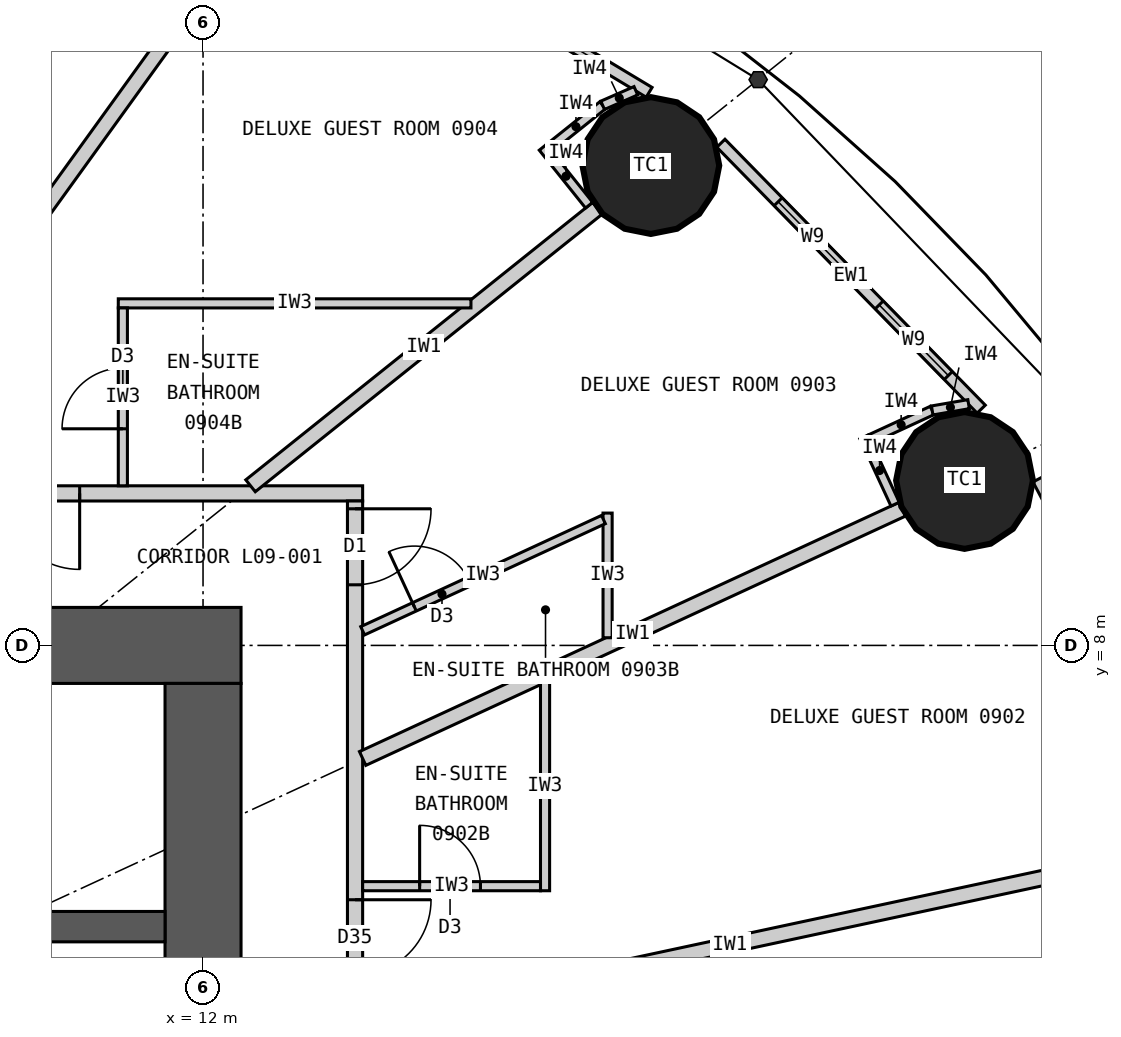
"""IFC4 building model, lengths in metres.
Left out: names, types, materials, properties, quantities, classifications, styles, units other than length and angle.
Written with IfcOpenShell. Run it as: python <this file> out.ifc"""

import sys

from ifc_helpers import new_model, si_unit, direction, frame, frame_2d, origin, origin_2d, place, context, subcontext, project, spatial, rectangle, circle, extrude, element, fill, save


model = new_model("IFC4")
c1 = context("Model", 3, precision=1e-05, world=origin(), true_north=direction((0.0, 1.0)))
c2 = subcontext(c1, "Body", "Model", "MODEL_VIEW")
j1 = project(units=[si_unit("LENGTHUNIT", "METRE"), si_unit("PLANEANGLEUNIT", "RADIAN")], contexts=[c1])
p1 = place(None, origin())
s1 = spatial("IfcSite", under=j1, at=p1, CompositionType="ELEMENT")
p2 = place(p1, origin())
s2 = spatial("IfcBuilding", under=s1, at=p2, CompositionType="ELEMENT")
p3 = place(p2, frame((0.0, 0.0, 42.6)))
s3 = spatial("IfcBuildingStorey", under=s2, at=p3, CompositionType="ELEMENT", Elevation=42.6)
for number, where, z_axis, x_axis in (
    (1, (22.019, 10.17, 0.0), (0.0, 0.0, 1.0), (1.0, 0.0, 0.0)),
    (2, (17.892, 14.313, 0.0), (0.0, 0.0, 1.0), (1.0, 0.0, 0.0)),
):
    element("IfcColumn", number, at=place(p3, frame(where, z_axis=z_axis, x_axis=x_axis)), inside=s3, PredefinedType="COLUMN", context=c2, shape_type="SweptSolid", body=[
        extrude(circle(Radius=0.9, at=origin_2d()), origin(), (0.0, 0.0, 1.0), 3.3),
    ])
p4 = place(p3, frame((-12.5, 8.0, 0.0), z_axis=(0.0, 0.0, 1.0), x_axis=(1.0, 0.0, 0.0)))
e3 = element("IfcWall", 3, at=p4, inside=s3, PredefinedType="SHEAR", context=c2, shape_type="SweptSolid", body=[
    extrude(rectangle(XDim=25.0, YDim=1.0, at=frame_2d((12.5, 0.0))), origin(), (0.0, 0.0, 1.0), 3.3),
])
p5 = place(p4, frame((11.2, 0.0, 0.0)))
e4 = element("IfcOpeningElement", 4, at=p5, cuts=e3, PredefinedType="OPENING", context=c2, shape_type="SweptSolid", body=[
    extrude(rectangle(XDim=1.2, YDim=2.2, at=frame_2d((0.6, 1.1))), frame((0.0, 0.51, 0.0), z_axis=(0.0, -1.0, 0.0), x_axis=(1.0, 0.0, 0.0)), (0.0, 0.0, 1.0), 1.02),
])
p6 = place(p4, frame((18.8, 0.0, 0.0)))
e5 = element("IfcOpeningElement", 5, at=p6, cuts=e3, PredefinedType="OPENING", context=c2, shape_type="SweptSolid", body=[
    extrude(rectangle(XDim=0.9, YDim=2.2, at=frame_2d((0.45, 1.1))), frame((0.0, 0.51, 0.0), z_axis=(0.0, -1.0, 0.0), x_axis=(1.0, 0.0, 0.0)), (0.0, 0.0, 1.0), 1.02),
])
p7 = place(p3, frame((12.0, -7.5, 0.0), z_axis=(0.0, 0.0, 1.0), x_axis=(0.0, 1.0, 0.0)))
e6 = element("IfcWall", 6, at=p7, inside=s3, PredefinedType="SHEAR", context=c2, shape_type="SweptSolid", body=[
    extrude(rectangle(XDim=15.0, YDim=1.0, at=frame_2d((7.5, 0.0))), origin(), (0.0, 0.0, 1.0), 3.3),
])
p8 = place(p7, frame((6.6, 0.0, 0.0)))
e7 = element("IfcOpeningElement", 7, at=p8, cuts=e6, PredefinedType="OPENING", context=c2, shape_type="SweptSolid", body=[
    extrude(rectangle(XDim=1.8, YDim=2.2, at=frame_2d((0.9, 1.1))), frame((0.0, 0.51, 0.0), z_axis=(0.0, -1.0, 0.0), x_axis=(1.0, 0.0, 0.0)), (0.0, 0.0, 1.0), 1.02),
])
p9 = place(p3, frame((-11.5, 4.3, 0.0), z_axis=(0.0, 0.0, 1.0), x_axis=(1.0, 0.0, 0.0)))
e8 = element("IfcWall", 8, at=p9, inside=s3, PredefinedType="SHEAR", context=c2, shape_type="SweptSolid", body=[
    extrude(rectangle(XDim=23.0, YDim=0.4, at=frame_2d((11.5, 0.0))), origin(), (0.0, 0.0, 1.0), 3.3),
])
p10 = place(p3, frame((25.139, 6.113, 0.0), z_axis=(0.0, 0.0, 1.0), x_axis=(-0.467303182954, 0.884097129959, 0.0)))
e9 = element("IfcWall", 9, at=p10, inside=s3, PredefinedType="ELEMENTEDWALL", context=c2, shape_type="SweptSolid", body=[
    extrude(rectangle(XDim=4.606, YDim=0.15, at=frame_2d((2.303, 0.0))), origin(), (0.0, 0.0, 1.0), 3.05),
])
p11 = place(p10, frame((0.531, 0.0, 0.9)))
e10 = element("IfcOpeningElement", 10, at=p11, cuts=e9, PredefinedType="OPENING", context=c2, shape_type="SweptSolid", body=[
    extrude(rectangle(XDim=1.3, YDim=1.9, at=frame_2d((0.65, 0.95))), frame((0.0, 0.085, 0.0), z_axis=(0.0, -1.0, 0.0), x_axis=(1.0, 0.0, 0.0)), (0.0, 0.0, 1.0), 0.17),
])
p12 = place(p10, frame((2.432, 0.0, 0.9)))
e11 = element("IfcOpeningElement", 11, at=p12, cuts=e9, PredefinedType="OPENING", context=c2, shape_type="SweptSolid", body=[
    extrude(rectangle(XDim=1.3, YDim=1.9, at=frame_2d((0.65, 0.95))), frame((0.0, 0.085, 0.0), z_axis=(0.0, -1.0, 0.0), x_axis=(1.0, 0.0, 0.0)), (0.0, 0.0, 1.0), 0.17),
])
p13 = place(p3, frame((22.239, 11.108, 0.0), z_axis=(0.0, 0.0, 1.0), x_axis=(-0.699612594083, 0.714522370679, 0.0)))
e12 = element("IfcWall", 12, at=p13, inside=s3, PredefinedType="ELEMENTEDWALL", context=c2, shape_type="SweptSolid", body=[
    extrude(rectangle(XDim=4.896, YDim=0.15, at=frame_2d((2.448, 0.0))), origin(), (0.0, 0.0, 1.0), 3.05),
])
p14 = place(p13, frame((0.619, 0.0, 0.9)))
e13 = element("IfcOpeningElement", 13, at=p14, cuts=e12, PredefinedType="OPENING", context=c2, shape_type="SweptSolid", body=[
    extrude(rectangle(XDim=1.3, YDim=1.9, at=frame_2d((0.65, 0.95))), frame((0.0, 0.085, 0.0), z_axis=(0.0, -1.0, 0.0), x_axis=(1.0, 0.0, 0.0)), (0.0, 0.0, 1.0), 0.17),
])
p15 = place(p13, frame((2.519, 0.0, 0.9)))
e14 = element("IfcOpeningElement", 14, at=p15, cuts=e12, PredefinedType="OPENING", context=c2, shape_type="SweptSolid", body=[
    extrude(rectangle(XDim=1.3, YDim=1.9, at=frame_2d((0.65, 0.95))), frame((0.0, 0.085, 0.0), z_axis=(0.0, -1.0, 0.0), x_axis=(1.0, 0.0, 0.0)), (0.0, 0.0, 1.0), 0.17),
])
p16 = place(p3, frame((17.869, 15.277, 0.0), z_axis=(0.0, 0.0, 1.0), x_axis=(-0.856958191554, 0.515385931054, 0.0)))
e15 = element("IfcWall", 15, at=p16, inside=s3, PredefinedType="ELEMENTEDWALL", context=c2, shape_type="SweptSolid", body=[
    extrude(rectangle(XDim=5.201, YDim=0.15, at=frame_2d((2.601, 0.0))), origin(), (0.0, 0.0, 1.0), 3.05),
])
p17 = place(p16, frame((0.776, 0.0, 0.9)))
e16 = element("IfcOpeningElement", 16, at=p17, cuts=e15, PredefinedType="OPENING", context=c2, shape_type="SweptSolid", body=[
    extrude(rectangle(XDim=1.3, YDim=1.9, at=frame_2d((0.65, 0.95))), frame((0.0, 0.085, 0.0), z_axis=(0.0, -1.0, 0.0), x_axis=(1.0, 0.0, 0.0)), (0.0, 0.0, 1.0), 0.17),
])
p18 = place(p16, frame((2.676, 0.0, 0.9)))
e17 = element("IfcOpeningElement", 17, at=p18, cuts=e15, PredefinedType="OPENING", context=c2, shape_type="SweptSolid", body=[
    extrude(rectangle(XDim=1.3, YDim=1.9, at=frame_2d((0.65, 0.95))), frame((0.0, 0.085, 0.0), z_axis=(0.0, -1.0, 0.0), x_axis=(1.0, 0.0, 0.0)), (0.0, 0.0, 1.0), 0.17),
])
p19 = place(p3, frame((-14.1, 10.0, 0.0), z_axis=(0.0, 0.0, 1.0), x_axis=(1.0, 0.0, 0.0)))
e18 = element("IfcWall", 18, at=p19, inside=s3, PredefinedType="PARTITIONING", context=c2, shape_type="SweptSolid", body=[
    extrude(rectangle(XDim=28.2, YDim=0.2, at=frame_2d((14.1, 0.0))), origin(), (0.0, 0.0, 1.0), 3.05),
])
p20 = place(p19, frame((23.477, 0.0, 0.0)))
e19 = element("IfcOpeningElement", 19, at=p20, cuts=e18, PredefinedType="OPENING", context=c2, shape_type="SweptSolid", body=[
    extrude(rectangle(XDim=1.0, YDim=2.2, at=frame_2d((0.5, 1.1))), frame((0.0, 0.11, 0.0), z_axis=(0.0, -1.0, 0.0), x_axis=(1.0, 0.0, 0.0)), (0.0, 0.0, 1.0), 0.22),
])
p21 = place(p19, frame((18.529, 0.0, 0.0)))
e20 = element("IfcOpeningElement", 20, at=p21, cuts=e18, PredefinedType="OPENING", context=c2, shape_type="SweptSolid", body=[
    extrude(rectangle(XDim=1.0, YDim=2.2, at=frame_2d((0.5, 1.1))), frame((0.0, 0.11, 0.0), z_axis=(0.0, -1.0, 0.0), x_axis=(1.0, 0.0, 0.0)), (0.0, 0.0, 1.0), 0.22),
])
p22 = place(p19, frame((14.623, 0.0, 0.0)))
e21 = element("IfcOpeningElement", 21, at=p22, cuts=e18, PredefinedType="OPENING", context=c2, shape_type="SweptSolid", body=[
    extrude(rectangle(XDim=1.0, YDim=2.2, at=frame_2d((0.5, 1.1))), frame((0.0, 0.11, 0.0), z_axis=(0.0, -1.0, 0.0), x_axis=(1.0, 0.0, 0.0)), (0.0, 0.0, 1.0), 0.22),
])
p23 = place(p19, frame((11.252, 0.0, 0.0)))
e22 = element("IfcOpeningElement", 22, at=p23, cuts=e18, PredefinedType="OPENING", context=c2, shape_type="SweptSolid", body=[
    extrude(rectangle(XDim=1.0, YDim=2.1, at=frame_2d((0.5, 1.05))), frame((0.0, 0.11, 0.0), z_axis=(0.0, -1.0, 0.0), x_axis=(1.0, 0.0, 0.0)), (0.0, 0.0, 1.0), 0.22),
])
p24 = place(p19, frame((8.671, 0.0, 0.0)))
e23 = element("IfcOpeningElement", 23, at=p24, cuts=e18, PredefinedType="OPENING", context=c2, shape_type="SweptSolid", body=[
    extrude(rectangle(XDim=1.0, YDim=2.2, at=frame_2d((0.5, 1.1))), frame((0.0, 0.11, 0.0), z_axis=(0.0, -1.0, 0.0), x_axis=(1.0, 0.0, 0.0)), (0.0, 0.0, 1.0), 0.22),
])
p25 = place(p19, frame((1.616, 0.0, 0.0)))
e24 = element("IfcOpeningElement", 24, at=p25, cuts=e18, PredefinedType="OPENING", context=c2, shape_type="SweptSolid", body=[
    extrude(rectangle(XDim=1.0, YDim=2.2, at=frame_2d((0.5, 1.1))), frame((0.0, 0.11, 0.0), z_axis=(0.0, -1.0, 0.0), x_axis=(1.0, 0.0, 0.0)), (0.0, 0.0, 1.0), 0.22),
])
p26 = place(p3, frame((14.0, -9.9, 0.0), z_axis=(0.0, 0.0, 1.0), x_axis=(0.0, 1.0, 0.0)))
e25 = element("IfcWall", 25, at=p26, inside=s3, PredefinedType="PARTITIONING", context=c2, shape_type="SweptSolid", body=[
    extrude(rectangle(XDim=19.8, YDim=0.2, at=frame_2d((9.9, 0.0))), origin(), (0.0, 0.0, 1.0), 3.05),
])
p27 = place(p26, frame((11.698, 0.0, 0.0)))
e26 = element("IfcOpeningElement", 26, at=p27, cuts=e25, PredefinedType="OPENING", context=c2, shape_type="SweptSolid", body=[
    extrude(rectangle(XDim=1.0, YDim=2.2, at=frame_2d((0.5, 1.1))), frame((0.0, 0.11, 0.0), z_axis=(0.0, -1.0, 0.0), x_axis=(1.0, 0.0, 0.0)), (0.0, 0.0, 1.0), 0.22),
])
p28 = place(p26, frame((13.554, 0.0, 0.0)))
e27 = element("IfcOpeningElement", 27, at=p28, cuts=e25, PredefinedType="OPENING", context=c2, shape_type="SweptSolid", body=[
    extrude(rectangle(XDim=1.0, YDim=2.0, at=frame_2d((0.5, 1.0))), frame((0.0, 0.11, 0.0), z_axis=(0.0, -1.0, 0.0), x_axis=(1.0, 0.0, 0.0)), (0.0, 0.0, 1.0), 0.22),
])
p29 = place(p26, frame((18.698, 0.0, 0.0)))
e28 = element("IfcOpeningElement", 28, at=p29, cuts=e25, PredefinedType="OPENING", context=c2, shape_type="SweptSolid", body=[
    extrude(rectangle(XDim=1.0, YDim=2.2, at=frame_2d((0.5, 1.1))), frame((0.0, 0.11, 0.0), z_axis=(0.0, -1.0, 0.0), x_axis=(1.0, 0.0, 0.0)), (0.0, 0.0, 1.0), 0.22),
])
p30 = place(p26, frame((0.975, 0.0, 0.0)))
e29 = element("IfcOpeningElement", 29, at=p30, cuts=e25, PredefinedType="OPENING", context=c2, shape_type="SweptSolid", body=[
    extrude(rectangle(XDim=1.0, YDim=2.2, at=frame_2d((0.5, 1.1))), frame((0.0, 0.11, 0.0), z_axis=(0.0, -1.0, 0.0), x_axis=(1.0, 0.0, 0.0)), (0.0, 0.0, 1.0), 0.22),
])
p31 = place(p26, frame((7.097, 0.0, 0.0)))
e30 = element("IfcOpeningElement", 30, at=p31, cuts=e25, PredefinedType="OPENING", context=c2, shape_type="SweptSolid", body=[
    extrude(rectangle(XDim=1.0, YDim=2.2, at=frame_2d((0.5, 1.1))), frame((0.0, 0.11, 0.0), z_axis=(0.0, -1.0, 0.0), x_axis=(1.0, 0.0, 0.0)), (0.0, 0.0, 1.0), 0.22),
])
p32 = place(p3, frame((14.1, 3.022, 0.0), z_axis=(0.0, 0.0, 1.0), x_axis=(0.977786510688, 0.209603290805, 0.0)))
e31 = element("IfcWall", 31, at=p32, inside=s3, PredefinedType="PARTITIONING", context=c2, shape_type="SweptSolid", body=[
    extrude(rectangle(XDim=9.887, YDim=0.2, at=frame_2d((4.943, 0.0))), origin(), (0.0, 0.0, 1.0), 2.05),
])
p33 = place(p3, frame((14.1, 6.512, 0.0), z_axis=(0.0, 0.0, 1.0), x_axis=(0.907842433118, 0.41931147925, 0.0)))
e32 = element("IfcWall", 32, at=p33, inside=s3, PredefinedType="PARTITIONING", context=c2, shape_type="SweptSolid", body=[
    extrude(rectangle(XDim=7.823, YDim=0.2, at=frame_2d((3.912, 0.0))), origin(), (0.0, 0.0, 1.0), 2.15),
])
p34 = place(p3, frame((12.625, 10.1, 0.0), z_axis=(0.0, 0.0, 1.0), x_axis=(0.780872884676, 0.624689953479, 0.0)))
e33 = element("IfcWall", 33, at=p34, inside=s3, PredefinedType="PARTITIONING", context=c2, shape_type="SweptSolid", body=[
    extrude(rectangle(XDim=5.845, YDim=0.2, at=frame_2d((2.922, 0.0))), origin(), (0.0, 0.0, 1.0), 2.15),
])
p35 = place(p3, frame((7.289, 10.1, 0.0), z_axis=(0.0, 0.0, 1.0), x_axis=(0.585216319319, 0.810877216108, 0.0)))
e34 = element("IfcWall", 34, at=p35, inside=s3, PredefinedType="PARTITIONING", context=c2, shape_type="SweptSolid", body=[
    extrude(rectangle(XDim=8.16, YDim=0.2, at=frame_2d((4.08, 0.0))), origin(), (0.0, 0.0, 1.0), 2.15),
])
p36 = place(p3, frame((16.5, 7.521, 0.0), z_axis=(0.0, 0.0, 1.0), x_axis=(0.0, -1.0, 0.0)))
e35 = element("IfcWall", 35, at=p36, inside=s3, PredefinedType="PARTITIONING", context=c2, shape_type="SweptSolid", body=[
    extrude(rectangle(XDim=2.749, YDim=0.12, at=frame_2d((1.374, 0.0))), origin(), (0.0, 0.0, 1.0), 3.05),
])
p37 = place(p3, frame((14.1, 4.833, 0.0), z_axis=(0.0, 0.0, 1.0), x_axis=(1.0, 0.0, 0.0)))
e36 = element("IfcWall", 36, at=p37, inside=s3, PredefinedType="PARTITIONING", context=c2, shape_type="SweptSolid", body=[
    extrude(rectangle(XDim=2.34, YDim=0.12, at=frame_2d((1.17, 0.0))), origin(), (0.0, 0.0, 1.0), 3.05),
])
p38 = place(p37, frame((0.75, 0.0, 0.0)))
e37 = element("IfcOpeningElement", 37, at=p38, cuts=e36, PredefinedType="OPENING", context=c2, shape_type="SweptSolid", body=[
    extrude(rectangle(XDim=0.8, YDim=2.1, at=frame_2d((0.4, 1.05))), frame((0.0, 0.07, 0.0), z_axis=(0.0, -1.0, 0.0), x_axis=(1.0, 0.0, 0.0)), (0.0, 0.0, 1.0), 0.14),
])
p39 = place(p3, frame((17.323, 8.101, 0.0), z_axis=(0.0, 0.0, 1.0), x_axis=(0.0, 1.0, 0.0)))
e38 = element("IfcWall", 38, at=p39, inside=s3, PredefinedType="PARTITIONING", context=c2, shape_type="SweptSolid", body=[
    extrude(rectangle(XDim=1.64, YDim=0.12, at=frame_2d((0.82, 0.0))), origin(), (0.0, 0.0, 1.0), 3.05),
])
p40 = place(p3, frame((14.1, 8.193, 0.0), z_axis=(0.0, 0.0, 1.0), x_axis=(0.907836493557, 0.419324338628, 0.0)))
e39 = element("IfcWall", 39, at=p40, inside=s3, PredefinedType="PARTITIONING", context=c2, shape_type="SweptSolid", body=[
    extrude(rectangle(XDim=3.49, YDim=0.12, at=frame_2d((1.745, 0.0))), origin(), (0.0, 0.0, 1.0), 3.05),
])
p41 = place(p40, frame((0.75, 0.0, 0.0)))
e40 = element("IfcOpeningElement", 40, at=p41, cuts=e39, PredefinedType="OPENING", context=c2, shape_type="SweptSolid", body=[
    extrude(rectangle(XDim=0.8, YDim=2.1, at=frame_2d((0.4, 1.05))), frame((0.0, 0.07, 0.0), z_axis=(0.0, -1.0, 0.0), x_axis=(1.0, 0.0, 0.0)), (0.0, 0.0, 1.0), 0.14),
])
p42 = place(p3, frame((15.525, 12.5, 0.0), z_axis=(0.0, 0.0, 1.0), x_axis=(-1.0, 0.0, 0.0)))
e41 = element("IfcWall", 41, at=p42, inside=s3, PredefinedType="PARTITIONING", context=c2, shape_type="SweptSolid", body=[
    extrude(rectangle(XDim=4.64, YDim=0.12, at=frame_2d((2.32, 0.0))), origin(), (0.0, 0.0, 1.0), 3.05),
])
p43 = place(p3, frame((10.945, 10.1, 0.0), z_axis=(0.0, 0.0, 1.0), x_axis=(0.0, 1.0, 0.0)))
e42 = element("IfcWall", 42, at=p43, inside=s3, PredefinedType="PARTITIONING", context=c2, shape_type="SweptSolid", body=[
    extrude(rectangle(XDim=2.34, YDim=0.12, at=frame_2d((1.17, 0.0))), origin(), (0.0, 0.0, 1.0), 3.05),
])
p44 = place(p43, frame((0.75, 0.0, 0.0)))
e43 = element("IfcOpeningElement", 43, at=p44, cuts=e42, PredefinedType="OPENING", context=c2, shape_type="SweptSolid", body=[
    extrude(rectangle(XDim=0.8, YDim=2.1, at=frame_2d((0.4, 1.05))), frame((0.0, 0.07, 0.0), z_axis=(0.0, -1.0, 0.0), x_axis=(1.0, 0.0, 0.0)), (0.0, 0.0, 1.0), 0.14),
])
p45 = place(p3, frame((21.106, 9.858, 0.0), z_axis=(0.0, 0.0, 1.0), x_axis=(-0.419344098106, 0.907827366509, 0.0)))
e44 = element("IfcWall", 44, at=p45, inside=s3, PredefinedType="PARTITIONING", context=c2, shape_type="SweptSolid", body=[
    extrude(rectangle(XDim=0.975, YDim=0.12, at=frame_2d((0.487, 0.0))), origin(), (0.0, 0.0, 1.0), 3.05),
])
p46 = place(p3, frame((20.777, 10.714, 0.0), z_axis=(0.0, 0.0, 1.0), x_axis=(0.907832324198, 0.419333365166, 0.0)))
e45 = element("IfcWall", 45, at=p46, inside=s3, PredefinedType="PARTITIONING", context=c2, shape_type="SweptSolid", body=[
    extrude(rectangle(XDim=0.9, YDim=0.12, at=frame_2d((0.45, 0.0))), origin(), (0.0, 0.0, 1.0), 3.05),
])
p47 = place(p3, frame((21.594, 11.091, 0.0), z_axis=(0.0, 0.0, 1.0), x_axis=(0.985483306792, 0.169772353566, 0.0)))
e46 = element("IfcWall", 46, at=p47, inside=s3, PredefinedType="PARTITIONING", context=c2, shape_type="SweptSolid", body=[
    extrude(rectangle(XDim=0.486, YDim=0.12, at=frame_2d((0.243, 0.0))), origin(), (0.0, 0.0, 1.0), 3.05),
])
p48 = place(p3, frame((17.08, 13.792, 0.0), z_axis=(0.0, 0.0, 1.0), x_axis=(-0.624756144097, 0.780819928289, 0.0)))
e47 = element("IfcWall", 47, at=p48, inside=s3, PredefinedType="PARTITIONING", context=c2, shape_type="SweptSolid", body=[
    extrude(rectangle(XDim=0.975, YDim=0.12, at=frame_2d((0.487, 0.0))), origin(), (0.0, 0.0, 1.0), 3.05),
])
p49 = place(p3, frame((16.555, 14.543, 0.0), z_axis=(0.0, 0.0, 1.0), x_axis=(0.780789399477, 0.62479429708, 0.0)))
e48 = element("IfcWall", 48, at=p49, inside=s3, PredefinedType="PARTITIONING", context=c2, shape_type="SweptSolid", body=[
    extrude(rectangle(XDim=0.9, YDim=0.12, at=frame_2d((0.45, 0.0))), origin(), (0.0, 0.0, 1.0), 3.05),
])
p50 = place(p3, frame((17.258, 15.106, 0.0), z_axis=(0.0, 0.0, 1.0), x_axis=(0.916098562583, 0.400953143937, 0.0)))
e49 = element("IfcWall", 49, at=p50, inside=s3, PredefinedType="PARTITIONING", context=c2, shape_type="SweptSolid", body=[
    extrude(rectangle(XDim=0.477, YDim=0.12, at=frame_2d((0.238, 0.0))), origin(), (0.0, 0.0, 1.0), 3.05),
])
p51 = place(p14, origin())
e50 = element("IfcWindow", 50, at=p51, inside=s3, PartitioningType="SINGLE_PANEL", PredefinedType="WINDOW", context=c2, shape_type="SweptSolid", body=[
    extrude(rectangle(XDim=1.3, YDim=1.9, at=frame_2d((0.65, 0.95))), frame((0.0, 0.03, 0.0), z_axis=(0.0, -1.0, 0.0), x_axis=(1.0, 0.0, 0.0)), (0.0, 0.0, 1.0), 0.06),
])
fill(e13, e50)
p52 = place(p15, origin())
e51 = element("IfcWindow", 51, at=p52, inside=s3, PartitioningType="SINGLE_PANEL", PredefinedType="WINDOW", context=c2, shape_type="SweptSolid", body=[
    extrude(rectangle(XDim=1.3, YDim=1.9, at=frame_2d((0.65, 0.95))), frame((0.0, 0.03, 0.0), z_axis=(0.0, -1.0, 0.0), x_axis=(1.0, 0.0, 0.0)), (0.0, 0.0, 1.0), 0.06),
])
fill(e14, e51)
p53 = place(p17, origin())
e52 = element("IfcWindow", 52, at=p53, inside=s3, PartitioningType="SINGLE_PANEL", PredefinedType="WINDOW", context=c2, shape_type="SweptSolid", body=[
    extrude(rectangle(XDim=1.3, YDim=1.9, at=frame_2d((0.65, 0.95))), frame((0.0, 0.03, 0.0), z_axis=(0.0, -1.0, 0.0), x_axis=(1.0, 0.0, 0.0)), (0.0, 0.0, 1.0), 0.06),
])
fill(e16, e52)
p54 = place(p38, origin())
e53 = element("IfcDoor", 53, at=p54, inside=s3, OperationType="SINGLE_SWING_LEFT", PredefinedType="DOOR", context=c2, shape_type="SweptSolid", body=[
    extrude(rectangle(XDim=0.8, YDim=2.1, at=frame_2d((0.4, 1.05))), frame((0.0, 0.025, 0.0), z_axis=(0.0, -1.0, 0.0), x_axis=(1.0, 0.0, 0.0)), (0.0, 0.0, 1.0), 0.05),
])
fill(e37, e53)
p55 = place(p28, origin())
e54 = element("IfcDoor", 54, at=p55, inside=s3, OperationType="SINGLE_SWING_RIGHT", PredefinedType="DOOR", context=c2, shape_type="SweptSolid", body=[
    extrude(rectangle(XDim=1.0, YDim=2.0, at=frame_2d((0.5, 1.0))), frame((0.0, 0.025, 0.0), z_axis=(0.0, -1.0, 0.0), x_axis=(1.0, 0.0, 0.0)), (0.0, 0.0, 1.0), 0.05),
])
fill(e27, e54)
p56 = place(p41, origin())
e55 = element("IfcDoor", 55, at=p56, inside=s3, OperationType="SINGLE_SWING_LEFT", PredefinedType="DOOR", context=c2, shape_type="SweptSolid", body=[
    extrude(rectangle(XDim=0.8, YDim=2.1, at=frame_2d((0.4, 1.05))), frame((0.0, 0.025, 0.0), z_axis=(0.0, -1.0, 0.0), x_axis=(1.0, 0.0, 0.0)), (0.0, 0.0, 1.0), 0.05),
])
fill(e40, e55)
p57 = place(p29, origin())
e56 = element("IfcDoor", 56, at=p57, inside=s3, OperationType="SINGLE_SWING_RIGHT", PredefinedType="DOOR", context=c2, shape_type="SweptSolid", body=[
    extrude(rectangle(XDim=1.0, YDim=2.2, at=frame_2d((0.5, 1.1))), frame((0.0, 0.025, 0.0), z_axis=(0.0, -1.0, 0.0), x_axis=(1.0, 0.0, 0.0)), (0.0, 0.0, 1.0), 0.05),
])
fill(e28, e56)
p58 = place(p44, origin())
e57 = element("IfcDoor", 57, at=p58, inside=s3, OperationType="SINGLE_SWING_LEFT", PredefinedType="DOOR", context=c2, shape_type="SweptSolid", body=[
    extrude(rectangle(XDim=0.8, YDim=2.1, at=frame_2d((0.4, 1.05))), frame((0.0, 0.025, 0.0), z_axis=(0.0, -1.0, 0.0), x_axis=(1.0, 0.0, 0.0)), (0.0, 0.0, 1.0), 0.05),
])
fill(e43, e57)
p59 = place(p20, origin())
e58 = element("IfcDoor", 58, at=p59, inside=s3, OperationType="SINGLE_SWING_RIGHT", PredefinedType="DOOR", context=c2, shape_type="SweptSolid", body=[
    extrude(rectangle(XDim=1.0, YDim=2.2, at=frame_2d((0.5, 1.1))), frame((0.0, 0.025, 0.0), z_axis=(0.0, -1.0, 0.0), x_axis=(1.0, 0.0, 0.0)), (0.0, 0.0, 1.0), 0.05),
])
fill(e19, e58)
save(model, sys.argv[1])
